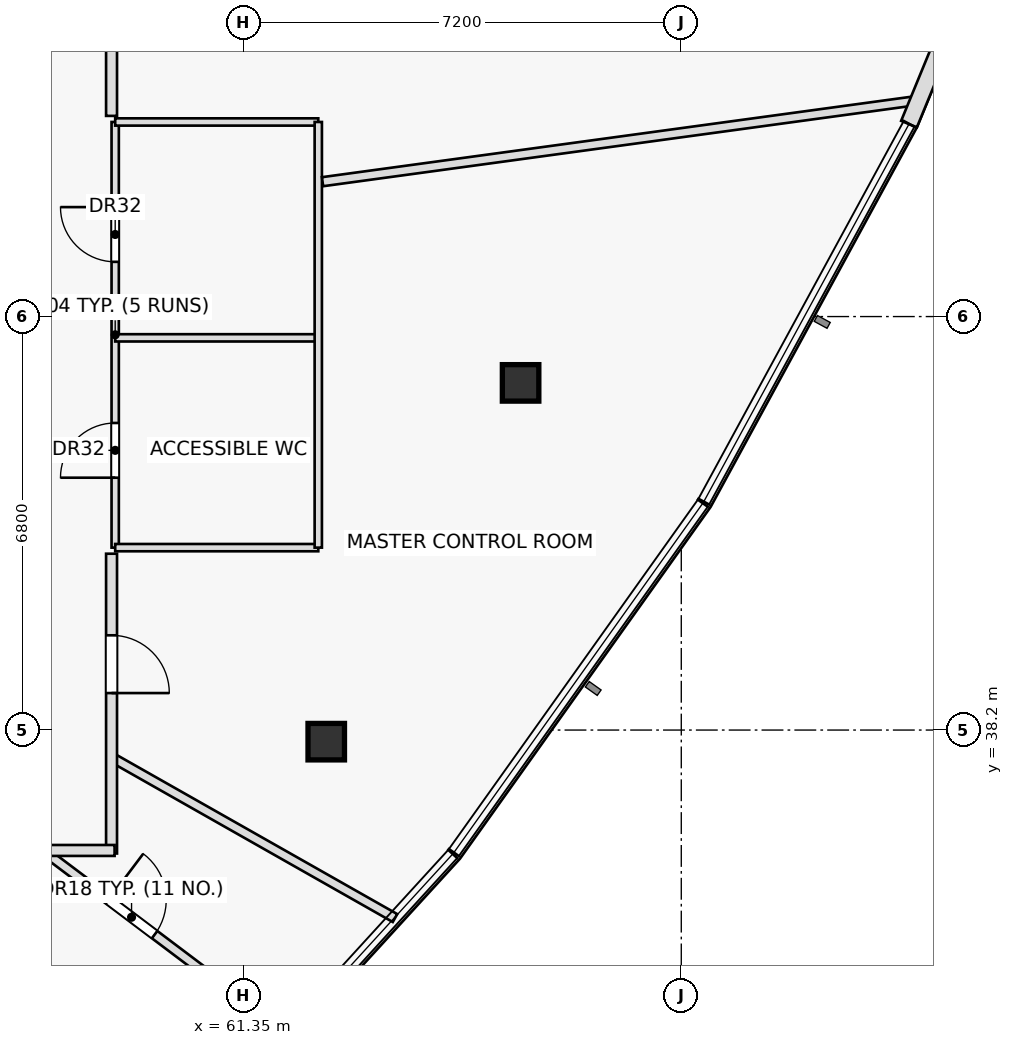
"""IFC4 building model, lengths in metres.
Left out: names, types, materials, properties, quantities, classifications, styles, units other than length and angle.
Written with IfcOpenShell. Run it as: python <this file> out.ifc"""

import sys

from ifc_helpers import new_model, si_unit, direction, frame, frame_2d, origin, origin_2d, place, context, subcontext, project, spatial, rectangle, hollow_rectangle, extrude, element, fill, save


model = new_model("IFC4")
c1 = context("Model", 3, precision=1e-05, world=origin(), true_north=direction((0.0, 1.0)))
c2 = subcontext(c1, "Body", "Model", "MODEL_VIEW")
j1 = project(units=[si_unit("LENGTHUNIT", "METRE"), si_unit("PLANEANGLEUNIT", "RADIAN")], contexts=[c1])
p1 = place(None, origin())
s1 = spatial("IfcSite", under=j1, at=p1, CompositionType="ELEMENT")
p2 = place(p1, origin())
s2 = spatial("IfcBuilding", under=s1, at=p2, CompositionType="ELEMENT")
p3 = place(p2, frame((0.0, 0.0, 226.1)))
s3 = spatial("IfcBuildingStorey", under=s2, at=p3, CompositionType="ELEMENT", Elevation=226.1)
for number, where, z_axis, x_axis in (
    (1, (62.711, 38.009, 0.0), (0.0, 0.0, 1.0), (1.0, 0.0, 0.0)),
    (2, (65.907, 43.909, 0.0), (0.0, 0.0, 1.0), (1.0, 0.0, 0.0)),
):
    element("IfcColumn", number, at=place(p3, frame(where, z_axis=z_axis, x_axis=x_axis)), inside=s3, PredefinedType="COLUMN", context=c2, shape_type="SweptSolid", body=[
        extrude(hollow_rectangle(XDim=0.6, YDim=0.6, WallThickness=0.036, at=origin_2d()), origin(), (0.0, 0.0, 1.0), 3.65),
    ])
p4 = place(p3, frame((59.24, 41.2, 0.0), z_axis=(0.0, 0.0, 1.0), x_axis=(0.0, 1.0, 0.0)))
e3 = element("IfcWall", 3, at=p4, inside=s3, PredefinedType="PARTITIONING", context=c2, shape_type="SweptSolid", body=[
    extrude(rectangle(XDim=7.0, YDim=0.12, at=frame_2d((3.5, 0.0))), origin(), (0.0, 0.0, 1.0), 3.65),
])
p5 = place(p4, frame((1.15, 0.0, 0.0)))
e4 = element("IfcOpeningElement", 4, at=p5, cuts=e3, PredefinedType="OPENING", context=c2, shape_type="SweptSolid", body=[
    extrude(rectangle(XDim=0.9, YDim=2.05, at=frame_2d((0.45, 1.025))), frame((0.0, 0.07, 0.0), z_axis=(0.0, -1.0, 0.0), x_axis=(1.0, 0.0, 0.0)), (0.0, 0.0, 1.0), 0.14),
])
p6 = place(p4, frame((4.7, 0.0, 0.0)))
e5 = element("IfcOpeningElement", 5, at=p6, cuts=e3, PredefinedType="OPENING", context=c2, shape_type="SweptSolid", body=[
    extrude(rectangle(XDim=0.9, YDim=2.05, at=frame_2d((0.45, 1.025))), frame((0.0, 0.07, 0.0), z_axis=(0.0, -1.0, 0.0), x_axis=(1.0, 0.0, 0.0)), (0.0, 0.0, 1.0), 0.14),
])
p7 = place(p3, frame((59.24, 41.2, 0.0), z_axis=(0.0, 0.0, 1.0), x_axis=(1.0, 0.0, 0.0)))
e6 = element("IfcWall", 6, at=p7, inside=s3, PredefinedType="PARTITIONING", context=c2, shape_type="SweptSolid", body=[
    extrude(rectangle(XDim=3.34, YDim=0.12, at=frame_2d((1.67, 0.0))), origin(), (0.0, 0.0, 1.0), 3.025),
])
for number, where, z_axis, x_axis in (
    (7, (59.24, 44.65, 0.0), (0.0, 0.0, 1.0), (1.0, 0.0, 0.0)),
    (8, (59.24, 48.2, 0.0), (0.0, 0.0, 1.0), (1.0, 0.0, 0.0)),
):
    element("IfcWall", number, at=place(p3, frame(where, z_axis=z_axis, x_axis=x_axis)), inside=s3, PredefinedType="PARTITIONING", context=c2, shape_type="SweptSolid", body=[
        extrude(rectangle(XDim=3.34, YDim=0.12, at=frame_2d((1.67, 0.0))), origin(), (0.0, 0.0, 1.0), 3.65),
    ])
p8 = place(p3, frame((62.58, 41.2, 0.0), z_axis=(0.0, 0.0, 1.0), x_axis=(0.0, 1.0, 0.0)))
e9 = element("IfcWall", 9, at=p8, inside=s3, PredefinedType="PARTITIONING", context=c2, shape_type="SweptSolid", body=[
    extrude(rectangle(XDim=7.0, YDim=0.12, at=frame_2d((3.5, 0.0))), origin(), (0.0, 0.0, 1.0), 3.325),
])
p9 = place(p3, frame((58.052, 36.22, 0.0), z_axis=(0.0, 0.0, 1.0), x_axis=(0.79862211322, -0.601832800931, 0.0)))
e10 = element("IfcWall", 10, at=p9, inside=s3, PredefinedType="PARTITIONING", context=c2, shape_type="SweptSolid", body=[
    extrude(rectangle(XDim=5.047, YDim=0.15, at=frame_2d((2.523, 0.0))), origin(), (0.0, 0.0, 1.0), 3.135),
])
p10 = place(p9, frame((1.35, 0.0, 0.0)))
e11 = element("IfcOpeningElement", 11, at=p10, cuts=e10, PredefinedType="OPENING", context=c2, shape_type="SweptSolid", body=[
    extrude(rectangle(XDim=0.95, YDim=2.05, at=frame_2d((0.475, 1.025))), frame((0.0, 0.085, 0.0), z_axis=(0.0, -1.0, 0.0), x_axis=(1.0, 0.0, 0.0)), (0.0, 0.0, 1.0), 0.17),
])
p11 = place(p3, frame((59.18, 37.752, 0.0), z_axis=(0.0, 0.0, 1.0), x_axis=(0.869856049735, -0.49330563826, 0.0)))
e12 = element("IfcWall", 12, at=p11, inside=s3, PredefinedType="PARTITIONING", context=c2, shape_type="SweptSolid", body=[
    extrude(rectangle(XDim=5.359, YDim=0.15, at=frame_2d((2.68, 0.0))), origin(), (0.0, 0.0, 1.0), 3.135),
])
p12 = place(p3, frame((62.65, 47.218, 0.0), z_axis=(0.0, 0.0, 1.0), x_axis=(0.990815618687, 0.135219857145, 0.0)))
e13 = element("IfcWall", 13, at=p12, inside=s3, PredefinedType="PARTITIONING", context=c2, shape_type="SweptSolid", body=[
    extrude(rectangle(XDim=9.909, YDim=0.15, at=frame_2d((4.954, 0.0))), origin(), (0.0, 0.0, 1.0), 3.135),
])
p13 = place(p3, frame((59.18, 53.83, 0.0), z_axis=(0.0, 0.0, 1.0), x_axis=(0.0, -1.0, 0.0)))
e14 = element("IfcWall", 14, at=p13, inside=s3, PredefinedType="PARTITIONING", context=c2, shape_type="SweptSolid", body=[
    extrude(rectangle(XDim=5.53, YDim=0.18, at=frame_2d((2.765, 0.0))), origin(), (0.0, 0.0, 1.0), 3.65),
])
p14 = place(p13, frame((2.709, 0.0, 0.0)))
e15 = element("IfcOpeningElement", 15, at=p14, cuts=e14, PredefinedType="OPENING", context=c2, shape_type="SweptSolid", body=[
    extrude(rectangle(XDim=0.95, YDim=2.05, at=frame_2d((0.475, 1.025))), frame((0.0, 0.1, 0.0), z_axis=(0.0, -1.0, 0.0), x_axis=(1.0, 0.0, 0.0)), (0.0, 0.0, 1.0), 0.2),
])
p15 = place(p3, frame((59.18, 41.1, 0.0), z_axis=(0.0, 0.0, 1.0), x_axis=(0.0, -1.0, 0.0)))
e16 = element("IfcWall", 16, at=p15, inside=s3, PredefinedType="PARTITIONING", context=c2, shape_type="SweptSolid", body=[
    extrude(rectangle(XDim=4.93, YDim=0.18, at=frame_2d((2.465, 0.0))), origin(), (0.0, 0.0, 1.0), 3.325),
])
p16 = place(p15, frame((1.342, 0.0, 0.0)))
e17 = element("IfcOpeningElement", 17, at=p16, cuts=e16, PredefinedType="OPENING", context=c2, shape_type="SweptSolid", body=[
    extrude(rectangle(XDim=0.95, YDim=2.05, at=frame_2d((0.475, 1.025))), frame((0.0, 0.1, 0.0), z_axis=(0.0, -1.0, 0.0), x_axis=(1.0, 0.0, 0.0)), (0.0, 0.0, 1.0), 0.2),
])
p17 = place(p3, frame((59.23, 36.22, 0.0), z_axis=(0.0, 0.0, 1.0), x_axis=(-1.0, 0.0, 0.0)))
e18 = element("IfcWall", 18, at=p17, inside=s3, PredefinedType="PARTITIONING", context=c2, shape_type="SweptSolid", body=[
    extrude(rectangle(XDim=19.48, YDim=0.18, at=frame_2d((9.74, 0.0))), origin(), (0.0, 0.0, 1.0), 3.025),
])
p18 = place(p17, frame((3.666, 0.0, 0.0)))
e19 = element("IfcOpeningElement", 19, at=p18, cuts=e18, PredefinedType="OPENING", context=c2, shape_type="SweptSolid", body=[
    extrude(rectangle(XDim=0.95, YDim=2.05, at=frame_2d((0.475, 1.025))), frame((0.0, 0.1, 0.0), z_axis=(0.0, -1.0, 0.0), x_axis=(1.0, 0.0, 0.0)), (0.0, 0.0, 1.0), 0.2),
])
p19 = place(p17, frame((9.579, 0.0, 0.0)))
e20 = element("IfcOpeningElement", 20, at=p19, cuts=e18, PredefinedType="OPENING", context=c2, shape_type="SweptSolid", body=[
    extrude(rectangle(XDim=0.95, YDim=2.05, at=frame_2d((0.475, 1.025))), frame((0.0, 0.1, 0.0), z_axis=(0.0, -1.0, 0.0), x_axis=(1.0, 0.0, 0.0)), (0.0, 0.0, 1.0), 0.2),
])
p20 = place(p17, frame((14.762, 0.0, 0.0)))
e21 = element("IfcOpeningElement", 21, at=p20, cuts=e18, PredefinedType="OPENING", context=c2, shape_type="SweptSolid", body=[
    extrude(rectangle(XDim=0.95, YDim=2.05, at=frame_2d((0.475, 1.025))), frame((0.0, 0.1, 0.0), z_axis=(0.0, -1.0, 0.0), x_axis=(1.0, 0.0, 0.0)), (0.0, 0.0, 1.0), 0.2),
])
p21 = place(p3, frame((72.295, 48.165, 0.0), z_axis=(0.0, 0.0, 1.0), x_axis=(0.380284386487, 0.924869604536, 0.0)))
e22 = element("IfcWall", 22, at=p21, inside=s3, PredefinedType="STANDARD", context=c2, shape_type="SweptSolid", body=[
    extrude(rectangle(XDim=1.847, YDim=0.28, at=frame_2d((0.923, 0.0))), origin(), (0.0, 0.0, 1.0), 3.65),
])
p22 = place(p5, origin())
e23 = element("IfcDoor", 23, at=p22, inside=s3, OperationType="SINGLE_SWING_LEFT", PredefinedType="DOOR", context=c2, shape_type="SweptSolid", body=[
    extrude(rectangle(XDim=0.9, YDim=2.05, at=frame_2d((0.45, 1.025))), frame((0.0, 0.025, 0.0), z_axis=(0.0, -1.0, 0.0), x_axis=(1.0, 0.0, 0.0)), (0.0, 0.0, 1.0), 0.05),
])
fill(e4, e23)
p23 = place(p6, origin())
e24 = element("IfcDoor", 24, at=p23, inside=s3, OperationType="SINGLE_SWING_RIGHT", PredefinedType="DOOR", context=c2, shape_type="SweptSolid", body=[
    extrude(rectangle(XDim=0.9, YDim=2.05, at=frame_2d((0.45, 1.025))), frame((0.0, 0.025, 0.0), z_axis=(0.0, -1.0, 0.0), x_axis=(1.0, 0.0, 0.0)), (0.0, 0.0, 1.0), 0.05),
])
fill(e5, e24)
p24 = place(p10, origin())
e25 = element("IfcDoor", 25, at=p24, inside=s3, OperationType="SINGLE_SWING_LEFT", PredefinedType="DOOR", context=c2, shape_type="SweptSolid", body=[
    extrude(rectangle(XDim=0.95, YDim=2.05, at=frame_2d((0.475, 1.025))), frame((0.0, 0.025, 0.0), z_axis=(0.0, -1.0, 0.0), x_axis=(1.0, 0.0, 0.0)), (0.0, 0.0, 1.0), 0.05),
])
fill(e11, e25)
p25 = place(p16, origin())
e26 = element("IfcDoor", 26, at=p25, inside=s3, OperationType="SINGLE_SWING_RIGHT", PredefinedType="DOOR", context=c2, shape_type="SweptSolid", body=[
    extrude(rectangle(XDim=0.95, YDim=2.05, at=frame_2d((0.475, 1.025))), frame((0.0, 0.025, 0.0), z_axis=(0.0, -1.0, 0.0), x_axis=(1.0, 0.0, 0.0)), (0.0, 0.0, 1.0), 0.05),
])
fill(e17, e26)
save(model, sys.argv[1])
